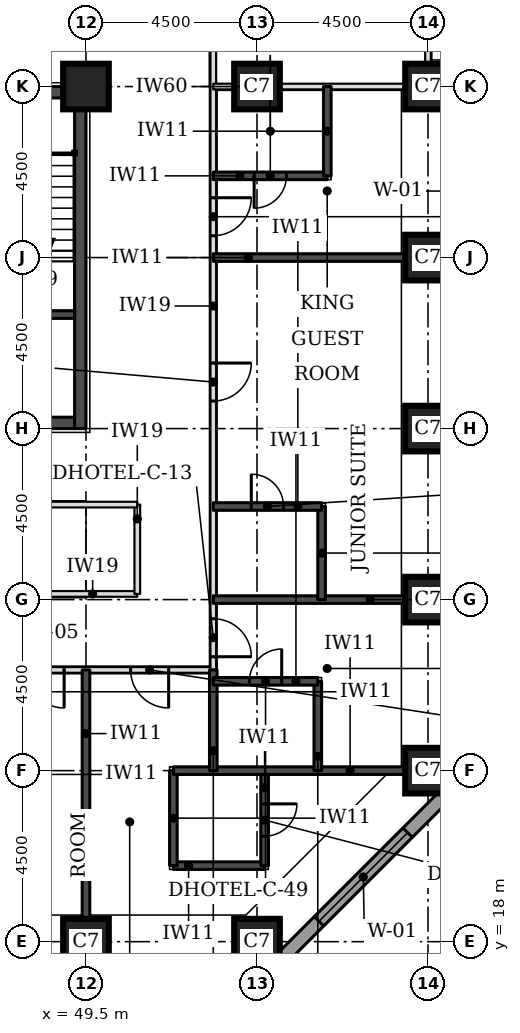
"""IFC4 building model, lengths in metres.
Left out: names, types, materials, properties, quantities, classifications, styles, units other than length and angle.
Written with IfcOpenShell. Run it as: python <this file> out.ifc"""

import sys

from ifc_helpers import new_model, si_unit, direction, frame, frame_2d, origin, origin_2d, place, context, subcontext, project, spatial, rectangle, extrude, element, fill, save


model = new_model("IFC4")
c1 = context("Model", 3, precision=1e-05, world=origin(), true_north=direction((0.0, 1.0)))
c2 = subcontext(c1, "Body", "Model", "MODEL_VIEW")
j1 = project(units=[si_unit("LENGTHUNIT", "METRE"), si_unit("PLANEANGLEUNIT", "RADIAN")], contexts=[c1])
p1 = place(None, origin())
s1 = spatial("IfcSite", under=j1, at=p1, CompositionType="ELEMENT")
p2 = place(p1, origin())
s2 = spatial("IfcBuilding", under=s1, at=p2, CompositionType="ELEMENT")
p3 = place(p2, frame((0.0, 0.0, 56.1)))
s3 = spatial("IfcBuildingStorey", under=s2, at=p3, CompositionType="ELEMENT", Elevation=56.1)
for number, where, z_axis, x_axis in (
    (1, (49.5, 18.0, 0.0), (0.0, 0.0, 1.0), (1.0, 0.0, 0.0)),
    (2, (54.0, 18.0, 0.0), (0.0, 0.0, 1.0), (1.0, 0.0, 0.0)),
    (3, (58.5, 22.5, 0.0), (0.0, 0.0, 1.0), (1.0, 0.0, 0.0)),
    (4, (58.5, 27.0, 0.0), (0.0, 0.0, 1.0), (1.0, 0.0, 0.0)),
    (5, (58.5, 31.5, 0.0), (0.0, 0.0, 1.0), (1.0, 0.0, 0.0)),
    (6, (58.5, 36.0, 0.0), (0.0, 0.0, 1.0), (1.0, 0.0, 0.0)),
    (7, (49.5, 40.5, 0.0), (0.0, 0.0, 1.0), (1.0, 0.0, 0.0)),
    (8, (54.0, 40.5, 0.0), (0.0, 0.0, 1.0), (1.0, 0.0, 0.0)),
    (9, (58.5, 40.5, 0.0), (0.0, 0.0, 1.0), (1.0, 0.0, 0.0)),
):
    element("IfcColumn", number, at=place(p3, frame(where, z_axis=z_axis, x_axis=x_axis)), inside=s3, PredefinedType="COLUMN", context=c2, shape_type="SweptSolid", body=[
        extrude(rectangle(XDim=1.2, YDim=1.2, at=origin_2d()), origin(), (0.0, 0.0, 1.0), 3.3),
    ])
p4 = place(p3, frame((40.8, 31.65, 0.0), z_axis=(0.0, 0.0, 1.0), x_axis=(1.0, 0.0, 0.0)))
e10 = element("IfcWall", 10, at=p4, inside=s3, PredefinedType="SHEAR", context=c2, shape_type="SweptSolid", body=[
    extrude(rectangle(XDim=8.4, YDim=0.3, at=frame_2d((4.2, 0.0))), origin(), (0.0, 0.0, 1.0), 3.3),
])
p5 = place(p4, frame((5.2, 0.0, 0.0)))
e11 = element("IfcOpeningElement", 11, at=p5, cuts=e10, PredefinedType="OPENING", context=c2, shape_type="SweptSolid", body=[
    extrude(rectangle(XDim=1.0, YDim=2.1, at=frame_2d((0.5, 1.05))), frame((0.0, 0.16, 0.0), z_axis=(0.0, -1.0, 0.0), x_axis=(1.0, 0.0, 0.0)), (0.0, 0.0, 1.0), 0.32),
])
p6 = place(p3, frame((40.8, 40.35, 0.0), z_axis=(0.0, 0.0, 1.0), x_axis=(1.0, 0.0, 0.0)))
e12 = element("IfcWall", 12, at=p6, inside=s3, PredefinedType="SHEAR", context=c2, shape_type="SweptSolid", body=[
    extrude(rectangle(XDim=8.4, YDim=0.3, at=frame_2d((4.2, 0.0))), origin(), (0.0, 0.0, 1.0), 3.3),
])
p7 = place(p6, frame((6.4, 0.0, 0.0)))
e13 = element("IfcOpeningElement", 13, at=p7, cuts=e12, PredefinedType="OPENING", context=c2, shape_type="SweptSolid", body=[
    extrude(rectangle(XDim=1.1, YDim=2.1, at=frame_2d((0.55, 1.05))), frame((0.0, 0.16, 0.0), z_axis=(0.0, -1.0, 0.0), x_axis=(1.0, 0.0, 0.0)), (0.0, 0.0, 1.0), 0.32),
])
p8 = place(p3, frame((49.35, 31.5, 0.0), z_axis=(0.0, 0.0, 1.0), x_axis=(0.0, 1.0, 0.0)))
e14 = element("IfcWall", 14, at=p8, inside=s3, PredefinedType="SHEAR", context=c2, shape_type="SweptSolid", body=[
    extrude(rectangle(XDim=9.0, YDim=0.3, at=frame_2d((4.5, 0.0))), origin(), (0.0, 0.0, 1.0), 3.3),
])
p9 = place(p3, frame((54.27, 17.174, 0.0), z_axis=(0.0, 0.0, 1.0), x_axis=(0.707106781187, 0.707106781187, 0.0)))
e15 = element("IfcWall", 15, at=p9, inside=s3, PredefinedType="STANDARD", context=c2, shape_type="SweptSolid", body=[
    extrude(rectangle(XDim=7.151, YDim=0.35, at=frame_2d((3.576, 0.0))), origin(), (0.0, 0.0, 1.0), 3.055),
])
p10 = place(p9, frame((1.926, 0.0, 0.8)))
e16 = element("IfcOpeningElement", 16, at=p10, cuts=e15, PredefinedType="OPENING", context=c2, shape_type="SweptSolid", body=[
    extrude(rectangle(XDim=3.3, YDim=1.5, at=frame_2d((1.65, 0.75))), frame((0.0, 0.185, 0.0), z_axis=(0.0, -1.0, 0.0), x_axis=(1.0, 0.0, 0.0)), (0.0, 0.0, 1.0), 0.37),
])
p11 = place(p3, frame((19.15, 25.15, 0.0), z_axis=(0.0, 0.0, 1.0), x_axis=(1.0, 0.0, 0.0)))
e17 = element("IfcWall", 17, at=p11, inside=s3, PredefinedType="PARTITIONING", context=c2, shape_type="SweptSolid", body=[
    extrude(rectangle(XDim=33.7, YDim=0.15, at=frame_2d((16.85, 0.0))), origin(), (0.0, 0.0, 1.0), 3.08),
])
p12 = place(p11, frame((4.175, 0.0, 0.0)))
e18 = element("IfcOpeningElement", 18, at=p12, cuts=e17, PredefinedType="OPENING", context=c2, shape_type="SweptSolid", body=[
    extrude(rectangle(XDim=1.0, YDim=2.1, at=frame_2d((0.5, 1.05))), frame((0.0, 0.085, 0.0), z_axis=(0.0, -1.0, 0.0), x_axis=(1.0, 0.0, 0.0)), (0.0, 0.0, 1.0), 0.17),
])
p13 = place(p11, frame((13.325, 0.0, 0.0)))
e19 = element("IfcOpeningElement", 19, at=p13, cuts=e17, PredefinedType="OPENING", context=c2, shape_type="SweptSolid", body=[
    extrude(rectangle(XDim=1.0, YDim=2.1, at=frame_2d((0.5, 1.05))), frame((0.0, 0.085, 0.0), z_axis=(0.0, -1.0, 0.0), x_axis=(1.0, 0.0, 0.0)), (0.0, 0.0, 1.0), 0.17),
])
p14 = place(p11, frame((19.625, 0.0, 0.0)))
e20 = element("IfcOpeningElement", 20, at=p14, cuts=e17, PredefinedType="OPENING", context=c2, shape_type="SweptSolid", body=[
    extrude(rectangle(XDim=1.0, YDim=2.1, at=frame_2d((0.5, 1.05))), frame((0.0, 0.085, 0.0), z_axis=(0.0, -1.0, 0.0), x_axis=(1.0, 0.0, 0.0)), (0.0, 0.0, 1.0), 0.17),
])
p15 = place(p11, frame((28.775, 0.0, 0.0)))
e21 = element("IfcOpeningElement", 21, at=p15, cuts=e17, PredefinedType="OPENING", context=c2, shape_type="SweptSolid", body=[
    extrude(rectangle(XDim=1.0, YDim=2.1, at=frame_2d((0.5, 1.05))), frame((0.0, 0.085, 0.0), z_axis=(0.0, -1.0, 0.0), x_axis=(1.0, 0.0, 0.0)), (0.0, 0.0, 1.0), 0.17),
])
p16 = place(p11, frame((1.175, 0.0, 0.0)))
e22 = element("IfcOpeningElement", 22, at=p16, cuts=e17, PredefinedType="OPENING", context=c2, shape_type="SweptSolid", body=[
    extrude(rectangle(XDim=1.0, YDim=2.1, at=frame_2d((0.5, 1.05))), frame((0.0, 0.085, 0.0), z_axis=(0.0, -1.0, 0.0), x_axis=(1.0, 0.0, 0.0)), (0.0, 0.0, 1.0), 0.17),
])
p17 = place(p11, frame((31.525, 0.0, 0.0)))
e23 = element("IfcOpeningElement", 23, at=p17, cuts=e17, PredefinedType="OPENING", context=c2, shape_type="SweptSolid", body=[
    extrude(rectangle(XDim=1.0, YDim=2.1, at=frame_2d((0.5, 1.05))), frame((0.0, 0.085, 0.0), z_axis=(0.0, -1.0, 0.0), x_axis=(1.0, 0.0, 0.0)), (0.0, 0.0, 1.0), 0.17),
])
p18 = place(p3, frame((52.85, 25.15, 0.0), z_axis=(0.0, 0.0, 1.0), x_axis=(0.0, 1.0, 0.0)))
e24 = element("IfcWall", 24, at=p18, inside=s3, PredefinedType="PARTITIONING", context=c2, shape_type="SweptSolid", body=[
    extrude(rectangle(XDim=22.35, YDim=0.15, at=frame_2d((11.175, 0.0))), origin(), (0.0, 0.0, 1.0), 3.08),
])
p19 = place(p18, frame((0.347, 0.0, 0.0)))
e25 = element("IfcOpeningElement", 25, at=p19, cuts=e24, PredefinedType="OPENING", context=c2, shape_type="SweptSolid", body=[
    extrude(rectangle(XDim=1.0, YDim=2.1, at=frame_2d((0.5, 1.05))), frame((0.0, 0.085, 0.0), z_axis=(0.0, -1.0, 0.0), x_axis=(1.0, 0.0, 0.0)), (0.0, 0.0, 1.0), 0.17),
])
p20 = place(p18, frame((7.075, 0.0, 0.0)))
e26 = element("IfcOpeningElement", 26, at=p20, cuts=e24, PredefinedType="OPENING", context=c2, shape_type="SweptSolid", body=[
    extrude(rectangle(XDim=1.0, YDim=2.1, at=frame_2d((0.5, 1.05))), frame((0.0, 0.085, 0.0), z_axis=(0.0, -1.0, 0.0), x_axis=(1.0, 0.0, 0.0)), (0.0, 0.0, 1.0), 0.17),
])
p21 = place(p18, frame((11.425, 0.0, 0.0)))
e27 = element("IfcOpeningElement", 27, at=p21, cuts=e24, PredefinedType="OPENING", context=c2, shape_type="SweptSolid", body=[
    extrude(rectangle(XDim=1.0, YDim=2.1, at=frame_2d((0.5, 1.05))), frame((0.0, 0.085, 0.0), z_axis=(0.0, -1.0, 0.0), x_axis=(1.0, 0.0, 0.0)), (0.0, 0.0, 1.0), 0.17),
])
p22 = place(p18, frame((17.15, 0.0, 0.0)))
e28 = element("IfcOpeningElement", 28, at=p22, cuts=e24, PredefinedType="OPENING", context=c2, shape_type="SweptSolid", body=[
    extrude(rectangle(XDim=0.9, YDim=2.1, at=frame_2d((0.45, 1.05))), frame((0.0, 0.085, 0.0), z_axis=(0.0, -1.0, 0.0), x_axis=(1.0, 0.0, 0.0)), (0.0, 0.0, 1.0), 0.17),
])
p23 = place(p3, frame((40.5, 27.15, 0.0), z_axis=(0.0, 0.0, 1.0), x_axis=(1.0, 0.0, 0.0)))
e29 = element("IfcWall", 29, at=p23, inside=s3, PredefinedType="PARTITIONING", context=c2, shape_type="SweptSolid", body=[
    extrude(rectangle(XDim=10.35, YDim=0.15, at=frame_2d((5.175, 0.0))), origin(), (0.0, 0.0, 1.0), 3.08),
])
p24 = place(p3, frame((50.85, 27.15, 0.0), z_axis=(0.0, 0.0, 1.0), x_axis=(0.0, 1.0, 0.0)))
e30 = element("IfcWall", 30, at=p24, inside=s3, PredefinedType="PARTITIONING", context=c2, shape_type="SweptSolid", body=[
    extrude(rectangle(XDim=2.35, YDim=0.15, at=frame_2d((1.175, 0.0))), origin(), (0.0, 0.0, 1.0), 3.08),
])
p25 = place(p3, frame((40.5, 29.5, 0.0), z_axis=(0.0, 0.0, 1.0), x_axis=(1.0, 0.0, 0.0)))
e31 = element("IfcWall", 31, at=p25, inside=s3, PredefinedType="PARTITIONING", context=c2, shape_type="SweptSolid", body=[
    extrude(rectangle(XDim=10.35, YDim=0.15, at=frame_2d((5.175, 0.0))), origin(), (0.0, 0.0, 1.0), 3.08),
])
p26 = place(p25, frame((4.06, 0.0, 0.0)))
e32 = element("IfcOpeningElement", 32, at=p26, cuts=e31, PredefinedType="OPENING", context=c2, shape_type="SweptSolid", body=[
    extrude(rectangle(XDim=0.9, YDim=2.1, at=frame_2d((0.45, 1.05))), frame((0.0, 0.085, 0.0), z_axis=(0.0, -1.0, 0.0), x_axis=(1.0, 0.0, 0.0)), (0.0, 0.0, 1.0), 0.17),
])
p27 = place(p3, frame((49.5, 18.6, 0.0), z_axis=(0.0, 0.0, 1.0), x_axis=(0.0, 1.0, 0.0)))
e33 = element("IfcWall", 33, at=p27, inside=s3, PredefinedType="SOLIDWALL", context=c2, shape_type="SweptSolid", body=[
    extrude(rectangle(XDim=6.55, YDim=0.2, at=frame_2d((3.275, 0.0))), origin(), (0.0, 0.0, 1.0), 3.08),
])
p28 = place(p3, frame((51.8, 20.0, 0.0), z_axis=(0.0, 0.0, 1.0), x_axis=(1.0, 0.0, 0.0)))
e34 = element("IfcWall", 34, at=p28, inside=s3, PredefinedType="SOLIDWALL", context=c2, shape_type="SweptSolid", body=[
    extrude(rectangle(XDim=2.4, YDim=0.2, at=frame_2d((1.2, 0.0))), origin(), (0.0, 0.0, 1.0), 3.08),
])
p29 = place(p3, frame((51.8, 20.0, 0.0), z_axis=(0.0, 0.0, 1.0), x_axis=(0.0, 1.0, 0.0)))
e35 = element("IfcWall", 35, at=p29, inside=s3, PredefinedType="SOLIDWALL", context=c2, shape_type="SweptSolid", body=[
    extrude(rectangle(XDim=2.5, YDim=0.2, at=frame_2d((1.25, 0.0))), origin(), (0.0, 0.0, 1.0), 3.08),
])
p30 = place(p3, frame((54.2, 20.0, 0.0), z_axis=(0.0, 0.0, 1.0), x_axis=(0.0, 1.0, 0.0)))
e36 = element("IfcWall", 36, at=p30, inside=s3, PredefinedType="SOLIDWALL", context=c2, shape_type="SweptSolid", body=[
    extrude(rectangle(XDim=2.5, YDim=0.2, at=frame_2d((1.25, 0.0))), origin(), (0.0, 0.0, 1.0), 3.08),
])
p31 = place(p30, frame((0.775, 0.0, 0.0)))
e37 = element("IfcOpeningElement", 37, at=p31, cuts=e36, PredefinedType="OPENING", context=c2, shape_type="SweptSolid", body=[
    extrude(rectangle(XDim=0.85, YDim=2.1, at=frame_2d((0.425, 1.05))), frame((0.0, 0.11, 0.0), z_axis=(0.0, -1.0, 0.0), x_axis=(1.0, 0.0, 0.0)), (0.0, 0.0, 1.0), 0.22),
])
p32 = place(p3, frame((51.8, 22.5, 0.0), z_axis=(0.0, 0.0, 1.0), x_axis=(1.0, 0.0, 0.0)))
e38 = element("IfcWall", 38, at=p32, inside=s3, PredefinedType="SOLIDWALL", context=c2, shape_type="SweptSolid", body=[
    extrude(rectangle(XDim=6.1, YDim=0.2, at=frame_2d((3.05, 0.0))), origin(), (0.0, 0.0, 1.0), 3.08),
])
p33 = place(p3, frame((52.85, 22.5, 0.0), z_axis=(0.0, 0.0, 1.0), x_axis=(0.0, 1.0, 0.0)))
e39 = element("IfcWall", 39, at=p33, inside=s3, PredefinedType="SOLIDWALL", context=c2, shape_type="SweptSolid", body=[
    extrude(rectangle(XDim=2.65, YDim=0.2, at=frame_2d((1.325, 0.0))), origin(), (0.0, 0.0, 1.0), 3.08),
])
p34 = place(p3, frame((55.6, 22.5, 0.0), z_axis=(0.0, 0.0, 1.0), x_axis=(0.0, 1.0, 0.0)))
e40 = element("IfcWall", 40, at=p34, inside=s3, PredefinedType="SOLIDWALL", context=c2, shape_type="SweptSolid", body=[
    extrude(rectangle(XDim=2.35, YDim=0.2, at=frame_2d((1.175, 0.0))), origin(), (0.0, 0.0, 1.0), 3.08),
])
p35 = place(p3, frame((52.85, 24.85, 0.0), z_axis=(0.0, 0.0, 1.0), x_axis=(1.0, 0.0, 0.0)))
e41 = element("IfcWall", 41, at=p35, inside=s3, PredefinedType="SOLIDWALL", context=c2, shape_type="SweptSolid", body=[
    extrude(rectangle(XDim=2.75, YDim=0.2, at=frame_2d((1.375, 0.0))), origin(), (0.0, 0.0, 1.0), 3.08),
])
p36 = place(p35, frame((0.95, 0.0, 0.0)))
e42 = element("IfcOpeningElement", 42, at=p36, cuts=e41, PredefinedType="OPENING", context=c2, shape_type="SweptSolid", body=[
    extrude(rectangle(XDim=0.85, YDim=2.1, at=frame_2d((0.425, 1.05))), frame((0.0, 0.11, 0.0), z_axis=(0.0, -1.0, 0.0), x_axis=(1.0, 0.0, 0.0)), (0.0, 0.0, 1.0), 0.22),
])
p37 = place(p3, frame((52.85, 27.0, 0.0), z_axis=(0.0, 0.0, 1.0), x_axis=(1.0, 0.0, 0.0)))
e43 = element("IfcWall", 43, at=p37, inside=s3, PredefinedType="SOLIDWALL", context=c2, shape_type="SweptSolid", body=[
    extrude(rectangle(XDim=5.05, YDim=0.2, at=frame_2d((2.525, 0.0))), origin(), (0.0, 0.0, 1.0), 3.08),
])
p38 = place(p3, frame((55.7, 27.0, 0.0), z_axis=(0.0, 0.0, 1.0), x_axis=(0.0, 1.0, 0.0)))
e44 = element("IfcWall", 44, at=p38, inside=s3, PredefinedType="SOLIDWALL", context=c2, shape_type="SweptSolid", body=[
    extrude(rectangle(XDim=2.45, YDim=0.2, at=frame_2d((1.225, 0.0))), origin(), (0.0, 0.0, 1.0), 3.08),
])
p39 = place(p3, frame((52.85, 29.45, 0.0), z_axis=(0.0, 0.0, 1.0), x_axis=(1.0, 0.0, 0.0)))
e45 = element("IfcWall", 45, at=p39, inside=s3, PredefinedType="SOLIDWALL", context=c2, shape_type="SweptSolid", body=[
    extrude(rectangle(XDim=2.85, YDim=0.2, at=frame_2d((1.425, 0.0))), origin(), (0.0, 0.0, 1.0), 3.08),
])
p40 = place(p39, frame((1.0, 0.0, 0.0)))
e46 = element("IfcOpeningElement", 46, at=p40, cuts=e45, PredefinedType="OPENING", context=c2, shape_type="SweptSolid", body=[
    extrude(rectangle(XDim=0.85, YDim=2.1, at=frame_2d((0.425, 1.05))), frame((0.0, 0.11, 0.0), z_axis=(0.0, -1.0, 0.0), x_axis=(1.0, 0.0, 0.0)), (0.0, 0.0, 1.0), 0.22),
])
p41 = place(p3, frame((52.85, 36.0, 0.0), z_axis=(0.0, 0.0, 1.0), x_axis=(1.0, 0.0, 0.0)))
e47 = element("IfcWall", 47, at=p41, inside=s3, PredefinedType="SOLIDWALL", context=c2, shape_type="SweptSolid", body=[
    extrude(rectangle(XDim=5.05, YDim=0.2, at=frame_2d((2.525, 0.0))), origin(), (0.0, 0.0, 1.0), 3.08),
])
p42 = place(p3, frame((52.85, 38.15, 0.0), z_axis=(0.0, 0.0, 1.0), x_axis=(1.0, 0.0, 0.0)))
e48 = element("IfcWall", 48, at=p42, inside=s3, PredefinedType="SOLIDWALL", context=c2, shape_type="SweptSolid", body=[
    extrude(rectangle(XDim=3.0, YDim=0.2, at=frame_2d((1.5, 0.0))), origin(), (0.0, 0.0, 1.0), 3.08),
])
p43 = place(p42, frame((1.075, 0.0, 0.0)))
e49 = element("IfcOpeningElement", 49, at=p43, cuts=e48, PredefinedType="OPENING", context=c2, shape_type="SweptSolid", body=[
    extrude(rectangle(XDim=0.85, YDim=2.1, at=frame_2d((0.425, 1.05))), frame((0.0, 0.11, 0.0), z_axis=(0.0, -1.0, 0.0), x_axis=(1.0, 0.0, 0.0)), (0.0, 0.0, 1.0), 0.22),
])
p44 = place(p3, frame((55.85, 38.15, 0.0), z_axis=(0.0, 0.0, 1.0), x_axis=(0.0, 1.0, 0.0)))
e50 = element("IfcWall", 50, at=p44, inside=s3, PredefinedType="SOLIDWALL", context=c2, shape_type="SweptSolid", body=[
    extrude(rectangle(XDim=2.35, YDim=0.2, at=frame_2d((1.175, 0.0))), origin(), (0.0, 0.0, 1.0), 3.08),
])
p45 = place(p3, frame((52.85, 40.5, 0.0), z_axis=(0.0, 0.0, 1.0), x_axis=(1.0, 0.0, 0.0)))
e51 = element("IfcWall", 51, at=p45, inside=s3, PredefinedType="PARTITIONING", context=c2, shape_type="SweptSolid", body=[
    extrude(rectangle(XDim=5.05, YDim=0.15, at=frame_2d((2.525, 0.0))), origin(), (0.0, 0.0, 1.0), 2.33),
])
p46 = place(p3, frame((58.5, 41.1, 0.0), z_axis=(0.0, 0.0, 1.0), x_axis=(0.0, 1.0, 0.0)))
e52 = element("IfcWall", 52, at=p46, inside=s3, PredefinedType="PARTITIONING", context=c2, shape_type="SweptSolid", body=[
    extrude(rectangle(XDim=6.4, YDim=0.15, at=frame_2d((3.2, 0.0))), origin(), (0.0, 0.0, 1.0), 3.08),
])
p47 = place(p3, frame((46.2, 34.5, 0.0), z_axis=(0.0, 0.0, 1.0), x_axis=(1.0, 0.0, 0.0)))
e53 = element("IfcWall", 53, at=p47, inside=s3, PredefinedType="SOLIDWALL", context=c2, shape_type="SweptSolid", body=[
    extrude(rectangle(XDim=3.0, YDim=0.2, at=frame_2d((1.5, 0.0))), origin(), (0.0, 0.0, 1.0), 3.08),
])
p48 = place(p10, origin())
e54 = element("IfcWindow", 54, at=p48, inside=s3, PartitioningType="SINGLE_PANEL", PredefinedType="WINDOW", context=c2, shape_type="SweptSolid", body=[
    extrude(rectangle(XDim=3.3, YDim=1.5, at=frame_2d((1.65, 0.75))), frame((0.0, 0.085, 0.0), z_axis=(0.0, -1.0, 0.0), x_axis=(1.0, 0.0, 0.0)), (0.0, 0.0, 1.0), 0.06),
])
fill(e16, e54)
p49 = place(p15, frame((1.0, 0.0, 0.0), z_axis=(0.0, 0.0, 1.0), x_axis=(-1.0, 0.0, 0.0)))
e55 = element("IfcDoor", 55, at=p49, inside=s3, OperationType="SINGLE_SWING_LEFT", PredefinedType="DOOR", context=c2, shape_type="SweptSolid", body=[
    extrude(rectangle(XDim=1.0, YDim=2.1, at=frame_2d((0.5, 1.05))), frame((0.0, 0.025, 0.0), z_axis=(0.0, -1.0, 0.0), x_axis=(1.0, 0.0, 0.0)), (0.0, 0.0, 1.0), 0.05),
])
fill(e21, e55)
p50 = place(p19, frame((1.0, 0.0, 0.0), z_axis=(0.0, 0.0, 1.0), x_axis=(-1.0, 0.0, 0.0)))
e56 = element("IfcDoor", 56, at=p50, inside=s3, OperationType="SINGLE_SWING_RIGHT", PredefinedType="DOOR", context=c2, shape_type="SweptSolid", body=[
    extrude(rectangle(XDim=1.0, YDim=2.1, at=frame_2d((0.5, 1.05))), frame((0.0, 0.025, 0.0), z_axis=(0.0, -1.0, 0.0), x_axis=(1.0, 0.0, 0.0)), (0.0, 0.0, 1.0), 0.05),
])
fill(e25, e56)
p51 = place(p36, origin())
e57 = element("IfcDoor", 57, at=p51, inside=s3, OperationType="SINGLE_SWING_RIGHT", PredefinedType="DOOR", context=c2, shape_type="SweptSolid", body=[
    extrude(rectangle(XDim=0.85, YDim=2.1, at=frame_2d((0.425, 1.05))), frame((0.0, 0.025, 0.0), z_axis=(0.0, -1.0, 0.0), x_axis=(1.0, 0.0, 0.0)), (0.0, 0.0, 1.0), 0.05),
])
fill(e42, e57)
p52 = place(p20, frame((1.0, 0.0, 0.0), z_axis=(0.0, 0.0, 1.0), x_axis=(-1.0, 0.0, 0.0)))
e58 = element("IfcDoor", 58, at=p52, inside=s3, OperationType="SINGLE_SWING_LEFT", PredefinedType="DOOR", context=c2, shape_type="SweptSolid", body=[
    extrude(rectangle(XDim=1.0, YDim=2.1, at=frame_2d((0.5, 1.05))), frame((0.0, 0.025, 0.0), z_axis=(0.0, -1.0, 0.0), x_axis=(1.0, 0.0, 0.0)), (0.0, 0.0, 1.0), 0.05),
])
fill(e26, e58)
p53 = place(p40, origin())
e59 = element("IfcDoor", 59, at=p53, inside=s3, OperationType="SINGLE_SWING_LEFT", PredefinedType="DOOR", context=c2, shape_type="SweptSolid", body=[
    extrude(rectangle(XDim=0.85, YDim=2.1, at=frame_2d((0.425, 1.05))), frame((0.0, 0.025, 0.0), z_axis=(0.0, -1.0, 0.0), x_axis=(1.0, 0.0, 0.0)), (0.0, 0.0, 1.0), 0.05),
])
fill(e46, e59)
p54 = place(p21, frame((1.0, 0.0, 0.0), z_axis=(0.0, 0.0, 1.0), x_axis=(-1.0, 0.0, 0.0)))
e60 = element("IfcDoor", 60, at=p54, inside=s3, OperationType="SINGLE_SWING_LEFT", PredefinedType="DOOR", context=c2, shape_type="SweptSolid", body=[
    extrude(rectangle(XDim=1.0, YDim=2.1, at=frame_2d((0.5, 1.05))), frame((0.0, 0.025, 0.0), z_axis=(0.0, -1.0, 0.0), x_axis=(1.0, 0.0, 0.0)), (0.0, 0.0, 1.0), 0.05),
])
fill(e27, e60)
p55 = place(p43, frame((0.85, 0.0, 0.0), z_axis=(0.0, 0.0, 1.0), x_axis=(-1.0, 0.0, 0.0)))
e61 = element("IfcDoor", 61, at=p55, inside=s3, OperationType="SINGLE_SWING_RIGHT", PredefinedType="DOOR", context=c2, shape_type="SweptSolid", body=[
    extrude(rectangle(XDim=0.85, YDim=2.1, at=frame_2d((0.425, 1.05))), frame((0.0, 0.025, 0.0), z_axis=(0.0, -1.0, 0.0), x_axis=(1.0, 0.0, 0.0)), (0.0, 0.0, 1.0), 0.05),
])
fill(e49, e61)
p56 = place(p17, frame((1.0, 0.0, 0.0), z_axis=(0.0, 0.0, 1.0), x_axis=(-1.0, 0.0, 0.0)))
e62 = element("IfcDoor", 62, at=p56, inside=s3, OperationType="SINGLE_SWING_LEFT", PredefinedType="DOOR", context=c2, shape_type="SweptSolid", body=[
    extrude(rectangle(XDim=1.0, YDim=2.1, at=frame_2d((0.5, 1.05))), frame((0.0, 0.025, 0.0), z_axis=(0.0, -1.0, 0.0), x_axis=(1.0, 0.0, 0.0)), (0.0, 0.0, 1.0), 0.05),
])
fill(e23, e62)
p57 = place(p31, frame((0.85, 0.0, 0.0), z_axis=(0.0, 0.0, 1.0), x_axis=(-1.0, 0.0, 0.0)))
e63 = element("IfcDoor", 63, at=p57, inside=s3, OperationType="SINGLE_SWING_LEFT", PredefinedType="DOOR", context=c2, shape_type="SweptSolid", body=[
    extrude(rectangle(XDim=0.85, YDim=2.1, at=frame_2d((0.425, 1.05))), frame((0.0, 0.025, 0.0), z_axis=(0.0, -1.0, 0.0), x_axis=(1.0, 0.0, 0.0)), (0.0, 0.0, 1.0), 0.05),
])
fill(e37, e63)
save(model, sys.argv[1])
